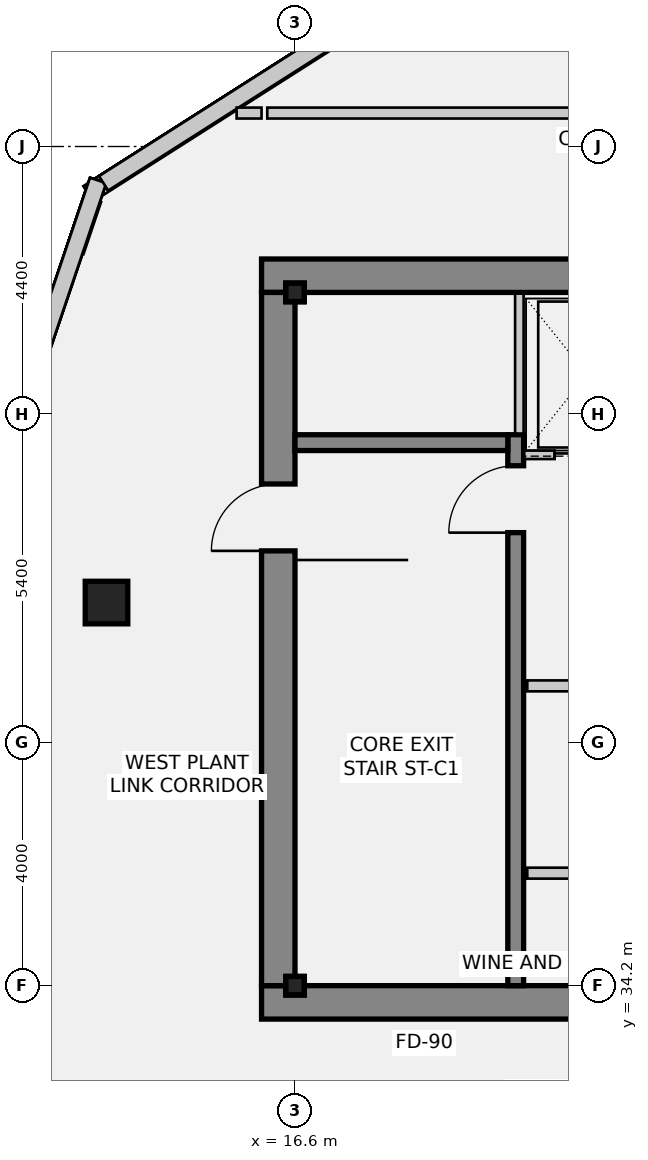
"""IFC4 building model, lengths in metres.
Left out: names, types, materials, properties, quantities, classifications, styles, units other than length and angle.
Written with IfcOpenShell. Run it as: python <this file> out.ifc"""

import sys

from ifc_helpers import new_model, si_unit, direction, frame, frame_2d, origin, origin_2d, place, context, subcontext, project, spatial, rectangle, hollow_rectangle, extrude, source, transform, mapped, element, fill, save


model = new_model("IFC4")
c1 = context("Model", 3, precision=1e-05, world=origin(), true_north=direction((0.0, 1.0)))
c2 = subcontext(c1, "Body", "Model", "MODEL_VIEW")
j1 = project(units=[si_unit("LENGTHUNIT", "METRE"), si_unit("PLANEANGLEUNIT", "RADIAN")], contexts=[c1])
p1 = place(None, origin())
s1 = spatial("IfcSite", under=j1, at=p1, CompositionType="ELEMENT")
p2 = place(p1, origin())
s2 = spatial("IfcBuilding", under=s1, at=p2, CompositionType="ELEMENT")
p3 = place(p2, frame((0.0, 0.0, 309.5)))
s3 = spatial("IfcBuildingStorey", under=s2, at=p3, CompositionType="ELEMENT", Elevation=309.5)
p4 = place(p3, frame((16.05, 45.875, 0.0), z_axis=(0.0, 0.0, 1.0), x_axis=(1.0, 0.0, 0.0)))
e1 = element("IfcWall", 1, at=p4, inside=s3, PredefinedType="SHEAR", context=c2, shape_type="SweptSolid", body=[
    extrude(rectangle(XDim=15.5, YDim=0.55, at=frame_2d((7.75, 0.0))), origin(), (0.0, 0.0, 1.0), 5.4),
])
p5 = place(p3, frame((16.05, 33.925, 0.0), z_axis=(0.0, 0.0, 1.0), x_axis=(1.0, 0.0, 0.0)))
e2 = element("IfcWall", 2, at=p5, inside=s3, PredefinedType="SHEAR", context=c2, shape_type="SweptSolid", body=[
    extrude(rectangle(XDim=15.5, YDim=0.55, at=frame_2d((7.75, 0.0))), origin(), (0.0, 0.0, 1.0), 5.4),
])
m1 = source(origin(), c2, "Body", "SweptSolid", [
    extrude(rectangle(XDim=1.1, YDim=2.15, at=frame_2d((0.55, 1.075))), frame((0.0, 0.285, 0.0), z_axis=(0.0, -1.0, 0.0), x_axis=(1.0, 0.0, 0.0)), (0.0, 0.0, 1.0), 0.57),
])
p6 = place(p5, frame((9.98, 0.0, 0.0)))
e3 = element("IfcOpeningElement", 3, at=p6, cuts=e2, PredefinedType="OPENING", context=c2, shape_type="MappedRepresentation", body=[
    mapped(m1, transform((0.0, 0.0, 0.0), scale=1.0)),
])
p7 = place(p3, frame((16.325, 34.2, 0.0), z_axis=(0.0, 0.0, 1.0), x_axis=(0.0, 1.0, 0.0)))
e4 = element("IfcWall", 4, at=p7, inside=s3, PredefinedType="SHEAR", context=c2, shape_type="SweptSolid", body=[
    extrude(rectangle(XDim=11.4, YDim=0.55, at=frame_2d((5.7, 0.0))), origin(), (0.0, 0.0, 1.0), 5.4),
])
p8 = place(p7, frame((7.15, 0.0, 0.0)))
e5 = element("IfcOpeningElement", 5, at=p8, cuts=e4, PredefinedType="OPENING", context=c2, shape_type="MappedRepresentation", body=[
    mapped(m1, transform((0.0, 0.0, 0.0), scale=1.0)),
])
p9 = place(p3, frame((20.23, 34.2, 0.0), z_axis=(0.0, 0.0, 1.0), x_axis=(0.0, 1.0, 0.0)))
e6 = element("IfcWall", 6, at=p9, inside=s3, PredefinedType="SHEAR", context=c2, shape_type="SweptSolid", body=[
    extrude(rectangle(XDim=9.06, YDim=0.26, at=frame_2d((4.53, 0.0))), origin(), (0.0, 0.0, 1.0), 5.4),
])
m2 = source(origin(), c2, "Body", "SweptSolid", [
    extrude(rectangle(XDim=1.1, YDim=2.15, at=frame_2d((0.55, 1.075))), frame((0.0, 0.14, 0.0), z_axis=(0.0, -1.0, 0.0), x_axis=(1.0, 0.0, 0.0)), (0.0, 0.0, 1.0), 0.28),
])
p10 = place(p9, frame((7.45, 0.0, 0.0)))
e7 = element("IfcOpeningElement", 7, at=p10, cuts=e6, PredefinedType="OPENING", context=c2, shape_type="MappedRepresentation", body=[
    mapped(m2, transform((0.0, 0.0, 0.0), scale=1.0)),
])
p11 = place(p3, frame((16.6, 43.13, 0.0), z_axis=(0.0, 0.0, 1.0), x_axis=(1.0, 0.0, 0.0)))
e8 = element("IfcWall", 8, at=p11, inside=s3, PredefinedType="SHEAR", context=c2, shape_type="SweptSolid", body=[
    extrude(rectangle(XDim=3.5, YDim=0.26, at=frame_2d((1.75, 0.0))), origin(), (0.0, 0.0, 1.0), 5.4),
])
m3 = source(origin(), c2, "Body", "SweptSolid", [
    extrude(rectangle(XDim=0.7, YDim=0.7, at=origin_2d()), origin(), (0.0, 0.0, 1.0), 5.4),
])
p12 = place(p3, frame((13.5, 40.5, 0.0), z_axis=(0.0, 0.0, 1.0), x_axis=(1.0, 0.0, 0.0)))
e9 = element("IfcColumn", 9, at=p12, inside=s3, PredefinedType="COLUMN", context=c2, shape_type="MappedRepresentation", body=[
    mapped(m3, transform((0.0, 0.0, 0.0), scale=1.0)),
])
m4 = source(origin(), c2, "Body", "SweptSolid", [
    extrude(hollow_rectangle(XDim=0.3, YDim=0.3, WallThickness=0.016, InnerFilletRadius=0.016, OuterFilletRadius=0.032, at=origin_2d()), origin(), (0.0, 0.0, 1.0), 3.684),
])
p13 = place(p3, frame((16.6, 34.2, 5.4), z_axis=(0.0, 0.0, 1.0), x_axis=(1.0, 0.0, 0.0)))
e10 = element("IfcColumn", 10, at=p13, inside=s3, PredefinedType="COLUMN", context=c2, shape_type="MappedRepresentation", body=[
    mapped(m4, transform((0.0, 0.0, 0.0), scale=1.0)),
])
m5 = source(origin(), c2, "Body", "SweptSolid", [
    extrude(hollow_rectangle(XDim=0.3, YDim=0.3, WallThickness=0.016, InnerFilletRadius=0.016, OuterFilletRadius=0.032, at=origin_2d()), origin(), (0.0, 0.0, 1.0), 3.969),
])
p14 = place(p3, frame((16.6, 45.6, 5.4), z_axis=(0.0, 0.0, 1.0), x_axis=(1.0, 0.0, 0.0)))
e11 = element("IfcColumn", 11, at=p14, inside=s3, PredefinedType="COLUMN", context=c2, shape_type="MappedRepresentation", body=[
    mapped(m5, transform((0.0, 0.0, 0.0), scale=1.0)),
])
m6 = source(origin(), c2, "Body", "SweptSolid", [
    extrude(hollow_rectangle(XDim=0.3, YDim=0.3, WallThickness=0.016, InnerFilletRadius=0.016, OuterFilletRadius=0.032, at=origin_2d()), origin(), (0.0, 0.0, 1.0), 4.485),
])
p15 = place(p3, frame((16.6, 34.2, 9.094), z_axis=(0.0, 0.0, 1.0), x_axis=(1.0, 0.0, 0.0)))
e12 = element("IfcColumn", 12, at=p15, inside=s3, PredefinedType="COLUMN", context=c2, shape_type="MappedRepresentation", body=[
    mapped(m6, transform((0.0, 0.0, 0.0), scale=1.0)),
])
m7 = source(origin(), c2, "Body", "SweptSolid", [
    extrude(hollow_rectangle(XDim=0.3, YDim=0.3, WallThickness=0.016, InnerFilletRadius=0.016, OuterFilletRadius=0.032, at=origin_2d()), origin(), (0.0, 0.0, 1.0), 4.491),
])
p16 = place(p3, frame((16.6, 45.6, 9.379), z_axis=(0.0, 0.0, 1.0), x_axis=(1.0, 0.0, 0.0)))
e13 = element("IfcColumn", 13, at=p16, inside=s3, PredefinedType="COLUMN", context=c2, shape_type="MappedRepresentation", body=[
    mapped(m7, transform((0.0, 0.0, 0.0), scale=1.0)),
])
m8 = source(origin(), c2, "Body", "SweptSolid", [
    extrude(hollow_rectangle(XDim=0.3, YDim=0.3, WallThickness=0.016, InnerFilletRadius=0.016, OuterFilletRadius=0.032, at=origin_2d()), origin(), (0.0, 0.0, 1.0), 4.485),
])
p17 = place(p3, frame((16.6, 34.2, 13.588), z_axis=(0.0, 0.0, 1.0), x_axis=(1.0, 0.0, 0.0)))
e14 = element("IfcColumn", 14, at=p17, inside=s3, PredefinedType="COLUMN", context=c2, shape_type="MappedRepresentation", body=[
    mapped(m8, transform((0.0, 0.0, 0.0), scale=1.0)),
])
m9 = source(origin(), c2, "Body", "SweptSolid", [
    extrude(hollow_rectangle(XDim=0.3, YDim=0.3, WallThickness=0.016, InnerFilletRadius=0.016, OuterFilletRadius=0.032, at=origin_2d()), origin(), (0.0, 0.0, 1.0), 4.49),
])
p18 = place(p3, frame((16.6, 45.6, 13.88), z_axis=(0.0, 0.0, 1.0), x_axis=(1.0, 0.0, 0.0)))
e15 = element("IfcColumn", 15, at=p18, inside=s3, PredefinedType="COLUMN", context=c2, shape_type="MappedRepresentation", body=[
    mapped(m9, transform((0.0, 0.0, 0.0), scale=1.0)),
])
m10 = source(origin(), c2, "Body", "SweptSolid", [
    extrude(hollow_rectangle(XDim=0.3, YDim=0.3, WallThickness=0.016, InnerFilletRadius=0.016, OuterFilletRadius=0.032, at=origin_2d()), origin(), (0.0, 0.0, 1.0), 3.865),
])
p19 = place(p3, frame((16.6, 34.2, 18.083), z_axis=(0.0, 0.0, 1.0), x_axis=(1.0, 0.0, 0.0)))
e16 = element("IfcColumn", 16, at=p19, inside=s3, PredefinedType="COLUMN", context=c2, shape_type="MappedRepresentation", body=[
    mapped(m10, transform((0.0, 0.0, 0.0), scale=1.0)),
])
m11 = source(origin(), c2, "Body", "SweptSolid", [
    extrude(hollow_rectangle(XDim=0.3, YDim=0.3, WallThickness=0.016, InnerFilletRadius=0.016, OuterFilletRadius=0.032, at=origin_2d()), origin(), (0.0, 0.0, 1.0), 3.871),
])
p20 = place(p3, frame((16.6, 45.6, 18.381), z_axis=(0.0, 0.0, 1.0), x_axis=(1.0, 0.0, 0.0)))
e17 = element("IfcColumn", 17, at=p20, inside=s3, PredefinedType="COLUMN", context=c2, shape_type="MappedRepresentation", body=[
    mapped(m11, transform((0.0, 0.0, 0.0), scale=1.0)),
])
p21 = place(p3, frame((21.873, 52.741, 0.0), z_axis=(0.0, 0.0, 1.0), x_axis=(-0.843654643366, -0.536886247474, 0.0)))
e18 = element("IfcWall", 18, at=p21, inside=s3, PredefinedType="SOLIDWALL", context=c2, shape_type="SweptSolid", body=[
    extrude(rectangle(XDim=10.281, YDim=0.3, at=frame_2d((5.141, 0.0))), origin(), (0.0, 0.0, 1.0), 5.1),
])
p22 = place(p3, frame((13.269, 47.134, 0.0), z_axis=(0.0, 0.0, 1.0), x_axis=(-0.31995770778, -0.947431826166, 0.0)))
e19 = element("IfcWall", 19, at=p22, inside=s3, PredefinedType="SOLIDWALL", context=c2, shape_type="SweptSolid", body=[
    extrude(rectangle(XDim=0.903, YDim=0.3, at=frame_2d((0.451, 0.0))), origin(), (0.0, 0.0, 1.0), 5.1),
])
p23 = place(p3, frame((8.102, 31.864, 5.4), z_axis=(0.0, 0.0, 1.0), x_axis=(0.319909448343, 0.947448122517, 0.0)))
e20 = element("IfcWall", 20, at=p23, inside=s3, PredefinedType="SOLIDWALL", context=c2, shape_type="SweptSolid", body=[
    extrude(rectangle(XDim=16.441, YDim=0.28, at=frame_2d((8.221, 0.0))), origin(), (0.0, 0.0, 1.0), 3.08),
])
p24 = place(p3, frame((13.452, 47.395, 5.4), z_axis=(0.0, 0.0, 1.0), x_axis=(0.843659536814, 0.536878557909, 0.0)))
e21 = element("IfcWall", 21, at=p24, inside=s3, PredefinedType="SOLIDWALL", context=c2, shape_type="SweptSolid", body=[
    extrude(rectangle(XDim=10.306, YDim=0.28, at=frame_2d((5.153, 0.0))), origin(), (0.0, 0.0, 1.0), 3.08),
])
p25 = place(p3, frame((8.102, 31.865, 8.822), z_axis=(0.0, 0.0, 1.0), x_axis=(0.319909621118, 0.947448064179, 0.0)))
e22 = element("IfcWall", 22, at=p25, inside=s3, PredefinedType="SOLIDWALL", context=c2, shape_type="SweptSolid", body=[
    extrude(rectangle(XDim=16.441, YDim=0.28, at=frame_2d((8.22, 0.0))), origin(), (0.0, 0.0, 1.0), 4.158),
])
p26 = place(p3, frame((13.452, 47.395, 9.346), z_axis=(0.0, 0.0, 1.0), x_axis=(0.843659536814, 0.536878557909, 0.0)))
e23 = element("IfcWall", 23, at=p26, inside=s3, PredefinedType="SOLIDWALL", context=c2, shape_type="SweptSolid", body=[
    extrude(rectangle(XDim=10.306, YDim=0.28, at=frame_2d((5.153, 0.0))), origin(), (0.0, 0.0, 1.0), 3.634),
])
p27 = place(p3, frame((8.102, 31.865, 13.312), z_axis=(0.0, 0.0, 1.0), x_axis=(0.31990979391, 0.947448005835, 0.0)))
e24 = element("IfcWall", 24, at=p27, inside=s3, PredefinedType="SOLIDWALL", context=c2, shape_type="SweptSolid", body=[
    extrude(rectangle(XDim=16.44, YDim=0.28, at=frame_2d((8.22, 0.0))), origin(), (0.0, 0.0, 1.0), 4.168),
])
p28 = place(p3, frame((13.452, 47.395, 13.845), z_axis=(0.0, 0.0, 1.0), x_axis=(0.843659536814, 0.536878557909, 0.0)))
e25 = element("IfcWall", 25, at=p28, inside=s3, PredefinedType="SOLIDWALL", context=c2, shape_type="SweptSolid", body=[
    extrude(rectangle(XDim=10.306, YDim=0.28, at=frame_2d((5.153, 0.0))), origin(), (0.0, 0.0, 1.0), 3.635),
])
p29 = place(p3, frame((8.103, 31.866, 17.801), z_axis=(0.0, 0.0, 1.0), x_axis=(0.319914468152, 0.947446427545, 0.0)))
e26 = element("IfcWall", 26, at=p29, inside=s3, PredefinedType="SOLIDWALL", context=c2, shape_type="SweptSolid", body=[
    extrude(rectangle(XDim=16.439, YDim=0.28, at=frame_2d((8.219, 0.0))), origin(), (0.0, 0.0, 1.0), 3.56),
])
p30 = place(p3, frame((13.452, 47.395, 18.345), z_axis=(0.0, 0.0, 1.0), x_axis=(0.843652708338, 0.536889288135, 0.0)))
e27 = element("IfcWall", 27, at=p30, inside=s3, PredefinedType="SOLIDWALL", context=c2, shape_type="SweptSolid", body=[
    extrude(rectangle(XDim=10.306, YDim=0.28, at=frame_2d((5.153, 0.0))), origin(), (0.0, 0.0, 1.0), 3.015),
])
p31 = place(p3, frame((20.37, 42.93, 0.0), z_axis=(0.0, 0.0, 1.0), x_axis=(1.0, 0.0, 0.0)))
e28 = element("IfcWall", 28, at=p31, inside=s3, PredefinedType="SOLIDWALL", context=c2, shape_type="SweptSolid", body=[
    extrude(rectangle(XDim=6.86, YDim=0.14, at=frame_2d((3.43, 0.0))), origin(), (0.0, 0.0, 1.0), 5.1),
])
m12 = source(origin(), c2, "Body", "SweptSolid", [
    extrude(rectangle(XDim=1.1, YDim=2.15, at=frame_2d((0.55, 1.075))), frame((0.0, 0.08, 0.0), z_axis=(0.0, -1.0, 0.0), x_axis=(1.0, 0.0, 0.0)), (0.0, 0.0, 1.0), 0.16),
])
p32 = place(p31, frame((0.5, 0.0, 0.0)))
e29 = element("IfcOpeningElement", 29, at=p32, cuts=e28, PredefinedType="OPENING", context=c2, shape_type="MappedRepresentation", body=[
    mapped(m12, transform((0.0, 0.0, 0.0), scale=1.0)),
])
p33 = place(p31, frame((2.7, 0.0, 0.0)))
e30 = element("IfcOpeningElement", 30, at=p33, cuts=e28, PredefinedType="OPENING", context=c2, shape_type="MappedRepresentation", body=[
    mapped(m12, transform((0.0, 0.0, 0.0), scale=1.0)),
])
p34 = place(p31, frame((5.1, 0.0, 0.0)))
e31 = element("IfcOpeningElement", 31, at=p34, cuts=e28, PredefinedType="OPENING", context=c2, shape_type="MappedRepresentation", body=[
    mapped(m12, transform((0.0, 0.0, 0.0), scale=1.0)),
])
p35 = place(p3, frame((20.29, 43.28, 0.0), z_axis=(0.0, 0.0, 1.0), x_axis=(0.0, 1.0, 0.0)))
e32 = element("IfcWall", 32, at=p35, inside=s3, PredefinedType="SOLIDWALL", context=c2, shape_type="SweptSolid", body=[
    extrude(rectangle(XDim=2.3, YDim=0.14, at=frame_2d((1.15, 0.0))), origin(), (0.0, 0.0, 1.0), 5.1),
])
p36 = place(p3, frame((27.2, 39.13, 0.0), z_axis=(0.0, 0.0, 1.0), x_axis=(-1.0, 0.0, 0.0)))
e33 = element("IfcWall", 33, at=p36, inside=s3, PredefinedType="PARTITIONING", context=c2, shape_type="SweptSolid", body=[
    extrude(rectangle(XDim=6.78, YDim=0.18, at=frame_2d((3.39, 0.0))), origin(), (0.0, 0.0, 1.0), 5.1),
])
m13 = source(origin(), c2, "Body", "SweptSolid", [
    extrude(rectangle(XDim=0.9, YDim=2.15, at=frame_2d((0.45, 1.075))), frame((0.0, 0.1, 0.0), z_axis=(0.0, -1.0, 0.0), x_axis=(1.0, 0.0, 0.0)), (0.0, 0.0, 1.0), 0.2),
])
p37 = place(p36, frame((0.28, 0.0, 0.0)))
e34 = element("IfcOpeningElement", 34, at=p37, cuts=e33, PredefinedType="OPENING", context=c2, shape_type="MappedRepresentation", body=[
    mapped(m13, transform((0.0, 0.0, 0.0), scale=1.0)),
])
p38 = place(p3, frame((20.42, 36.05, 0.0), z_axis=(0.0, 0.0, 1.0), x_axis=(1.0, 0.0, 0.0)))
e35 = element("IfcWall", 35, at=p38, inside=s3, PredefinedType="PARTITIONING", context=c2, shape_type="SweptSolid", body=[
    extrude(rectangle(XDim=5.46, YDim=0.18, at=frame_2d((2.73, 0.0))), origin(), (0.0, 0.0, 1.0), 5.1),
])
p39 = place(p38, frame((2.219, 0.0, 0.0)))
e36 = element("IfcOpeningElement", 36, at=p39, cuts=e35, PredefinedType="OPENING", context=c2, shape_type="MappedRepresentation", body=[
    mapped(m13, transform((0.0, 0.0, 0.0), scale=1.0)),
])
p40 = place(p3, frame((15.64, 48.55, 0.0), z_axis=(0.0, 0.0, 1.0), x_axis=(1.0, 0.0, 0.0)))
e37 = element("IfcWall", 37, at=p40, inside=s3, PredefinedType="PARTITIONING", context=c2, shape_type="SweptSolid", body=[
    extrude(rectangle(XDim=0.41, YDim=0.18, at=frame_2d((0.205, 0.0))), origin(), (0.0, 0.0, 1.0), 5.1),
])
p41 = place(p3, frame((16.144, 48.55, 0.0), z_axis=(0.0, 0.0, 1.0), x_axis=(1.0, 0.0, 0.0)))
e38 = element("IfcWall", 38, at=p41, inside=s3, PredefinedType="PARTITIONING", context=c2, shape_type="SweptSolid", body=[
    extrude(rectangle(XDim=17.656, YDim=0.18, at=frame_2d((8.828, 0.0))), origin(), (0.0, 0.0, 1.0), 4.392),
])
m14 = source(origin(), c2, "Body", "SweptSolid", [
    extrude(rectangle(XDim=1.1, YDim=2.15, at=frame_2d((0.55, 1.075))), frame((0.0, 0.1, 0.0), z_axis=(0.0, -1.0, 0.0), x_axis=(1.0, 0.0, 0.0)), (0.0, 0.0, 1.0), 0.2),
])
p42 = place(p41, frame((9.06, 0.0, 0.0)))
e39 = element("IfcOpeningElement", 39, at=p42, cuts=e38, PredefinedType="OPENING", context=c2, shape_type="MappedRepresentation", body=[
    mapped(m14, transform((0.0, 0.0, 0.0), scale=1.0)),
])
p43 = place(p3, frame((0.0, 0.0, 5.1)))
p44 = place(p43, frame((21.6, 35.4, 0.0)))
p45 = place(p44, frame((0.0, 0.0, 0.25)))
e40 = element("IfcDoor", 40, at=p45, inside=s3, OperationType="SINGLE_SWING_LEFT", PredefinedType="TRAPDOOR", context=c2, shape_type="SweptSolid", body=[
    extrude(rectangle(XDim=1.1, YDim=1.1, at=origin_2d()), origin(), (0.0, 0.0, 1.0), 0.05),
])
p46 = place(p43, frame((22.0, 40.2, 0.0)))
p47 = place(p46, frame((0.0, 0.0, 0.25)))
e41 = element("IfcWindow", 41, at=p47, inside=s3, PartitioningType="SINGLE_PANEL", PredefinedType="SKYLIGHT", context=c2, shape_type="SweptSolid", body=[
    extrude(rectangle(XDim=2.2, YDim=2.2, at=origin_2d()), origin(), (0.0, 0.0, 1.0), 0.05),
])
m15 = source(origin(), c2, "Body", "SweptSolid", [
    extrude(rectangle(XDim=1.1, YDim=2.15, at=frame_2d((0.55, 1.075))), frame((0.0, 0.025, 0.0), z_axis=(0.0, -1.0, 0.0), x_axis=(1.0, 0.0, 0.0)), (0.0, 0.0, 1.0), 0.05),
])
p48 = place(p32, origin())
e42 = element("IfcDoor", 42, at=p48, inside=s3, OperationType="SLIDING_TO_LEFT", PredefinedType="DOOR", context=c2, shape_type="MappedRepresentation", body=[
    mapped(m15, transform((0.0, 0.0, 0.0), scale=1.0)),
])
fill(e29, e42)
m16 = source(origin(), c2, "Body", "SweptSolid", [
    extrude(rectangle(XDim=1.1, YDim=2.15, at=frame_2d((0.55, 1.075))), frame((0.0, 0.025, 0.0), z_axis=(0.0, -1.0, 0.0), x_axis=(1.0, 0.0, 0.0)), (0.0, 0.0, 1.0), 0.05),
])
p49 = place(p10, origin())
e43 = element("IfcDoor", 43, at=p49, inside=s3, OperationType="SINGLE_SWING_LEFT", PredefinedType="DOOR", context=c2, shape_type="MappedRepresentation", body=[
    mapped(m16, transform((0.0, 0.0, 0.0), scale=1.0)),
])
fill(e7, e43)
p50 = place(p8, origin())
e44 = element("IfcDoor", 44, at=p50, inside=s3, OperationType="SINGLE_SWING_LEFT", PredefinedType="DOOR", context=c2, shape_type="MappedRepresentation", body=[
    mapped(m16, transform((0.0, 0.0, 0.0), scale=1.0)),
])
fill(e5, e44)
save(model, sys.argv[1])
